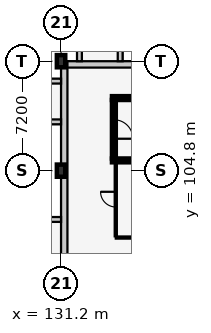
"""IFC4 building model, lengths in metres.
Left out: names, types, materials, properties, quantities, classifications, styles, units other than length and angle.
Written with IfcOpenShell. Run it as: python <this file> out.ifc"""

import sys

from ifc_helpers import new_model, si_unit, direction, frame, frame_2d, origin, origin_2d, place, context, subcontext, project, spatial, rectangle, extrude, element, fill, save


model = new_model("IFC4")
c1 = context("Model", 3, precision=1e-05, world=origin(), true_north=direction((0.0, 1.0)))
c2 = subcontext(c1, "Body", "Model", "MODEL_VIEW")
j1 = project(units=[si_unit("LENGTHUNIT", "METRE"), si_unit("PLANEANGLEUNIT", "RADIAN")], contexts=[c1])
p1 = place(None, origin())
s1 = spatial("IfcSite", under=j1, at=p1, CompositionType="ELEMENT")
p2 = place(p1, origin())
s2 = spatial("IfcBuilding", under=s1, at=p2, CompositionType="ELEMENT")
p3 = place(p2, frame((0.0, 0.0, 13.8)))
s3 = spatial("IfcBuildingStorey", under=s2, at=p3, CompositionType="ELEMENT", Elevation=13.8)
for number, where, z_axis, x_axis in (
    (1, (131.2, 104.8, 0.0), (0.0, 0.0, 1.0), (1.0, 0.0, 0.0)),
    (2, (131.2, 112.0, 0.0), (0.0, 0.0, 1.0), (1.0, 0.0, 0.0)),
):
    element("IfcColumn", number, at=place(p3, frame(where, z_axis=z_axis, x_axis=x_axis)), inside=s3, PredefinedType="COLUMN", context=c2, shape_type="SweptSolid", body=[
        extrude(rectangle(XDim=0.55, YDim=0.8, at=origin_2d()), origin(), (0.0, 0.0, 1.0), 4.2),
    ])
p4 = place(p3, frame((131.2, 111.79, 0.0), z_axis=(0.0, 0.0, 1.0), x_axis=(1.0, 0.0, 0.0)))
e3 = element("IfcWall", 3, at=p4, inside=s3, PredefinedType="SOLIDWALL", context=c2, shape_type="SweptSolid", body=[
    extrude(rectangle(XDim=28.8, YDim=0.42, at=frame_2d((14.4, 0.0))), origin(), (0.0, 0.0, 1.0), 3.245),
])
p5 = place(p3, frame((132.41, 112.0, 0.0), z_axis=(0.0, 0.0, 1.0), x_axis=(0.0, 1.0, 0.0)))
e4 = element("IfcWall", 4, at=p5, inside=s3, PredefinedType="SOLIDWALL", context=c2, shape_type="SweptSolid", body=[
    extrude(rectangle(XDim=1.793, YDim=0.32, at=frame_2d((0.896, 0.0))), origin(), (0.0, 0.0, 1.0), 3.93),
])
p6 = place(p3, frame((135.09, 112.0, 0.0), z_axis=(0.0, 0.0, 1.0), x_axis=(0.0, 1.0, 0.0)))
e5 = element("IfcWall", 5, at=p6, inside=s3, PredefinedType="SOLIDWALL", context=c2, shape_type="SweptSolid", body=[
    extrude(rectangle(XDim=1.35, YDim=0.32, at=frame_2d((0.675, 0.0))), origin(), (0.0, 0.0, 1.0), 3.93),
])
p7 = place(p3, frame((131.41, 83.2, 0.0), z_axis=(0.0, 0.0, 1.0), x_axis=(0.0, 1.0, 0.0)))
e6 = element("IfcWall", 6, at=p7, inside=s3, PredefinedType="SOLIDWALL", context=c2, shape_type="SweptSolid", body=[
    extrude(rectangle(XDim=28.8, YDim=0.42, at=frame_2d((14.4, 0.0))), origin(), (0.0, 0.0, 1.0), 3.205),
])
for number, where, z_axis, x_axis in (
    (7, (131.2, 101.59, 0.0), (0.0, 0.0, 1.0), (-1.0, 0.0, 0.0)),
    (8, (131.2, 108.01, 0.0), (0.0, 0.0, 1.0), (-1.0, 0.0, 0.0)),
):
    element("IfcWall", number, at=place(p3, frame(where, z_axis=z_axis, x_axis=x_axis)), inside=s3, PredefinedType="SOLIDWALL", context=c2, shape_type="SweptSolid", body=[
        extrude(rectangle(XDim=1.35, YDim=0.32, at=frame_2d((0.675, 0.0))), origin(), (0.0, 0.0, 1.0), 3.93),
    ])
p8 = place(p3, frame((131.2, 110.69, 0.0), z_axis=(0.0, 0.0, 1.0), x_axis=(-1.0, 0.0, 0.0)))
e9 = element("IfcWall", 9, at=p8, inside=s3, PredefinedType="SOLIDWALL", context=c2, shape_type="SweptSolid", body=[
    extrude(rectangle(XDim=1.793, YDim=0.32, at=frame_2d((0.896, 0.0))), origin(), (0.0, 0.0, 1.0), 3.93),
])
for number, where, z_axis, x_axis in (
    (10, (134.55, 105.475, 0.0), (0.0, 0.0, 1.0), (1.0, 0.0, 0.0)),
    (11, (143.45, 109.575, 0.0), (0.0, 0.0, 1.0), (-1.0, 0.0, 0.0)),
):
    element("IfcWall", number, at=place(p3, frame(where, z_axis=z_axis, x_axis=x_axis)), inside=s3, PredefinedType="SHEAR", context=c2, shape_type="SweptSolid", body=[
        extrude(rectangle(XDim=8.9, YDim=0.25, at=frame_2d((4.45, 0.0))), origin(), (0.0, 0.0, 1.0), 3.95),
    ])
p9 = place(p3, frame((134.675, 109.45, 0.0), z_axis=(0.0, 0.0, 1.0), x_axis=(0.0, -1.0, 0.0)))
e12 = element("IfcWall", 12, at=p9, inside=s3, PredefinedType="SHEAR", context=c2, shape_type="SweptSolid", body=[
    extrude(rectangle(XDim=3.85, YDim=0.25, at=frame_2d((1.925, 0.0))), origin(), (0.0, 0.0, 1.0), 3.95),
])
p10 = place(p9, frame((1.3, 0.0, 0.0)))
e13 = element("IfcOpeningElement", 13, at=p10, cuts=e12, PredefinedType="OPENING", context=c2, shape_type="SweptSolid", body=[
    extrude(rectangle(XDim=1.25, YDim=2.15, at=frame_2d((0.625, 1.075))), frame((0.0, 0.137, 0.0), z_axis=(0.0, -1.0, 0.0), x_axis=(1.0, 0.0, 0.0)), (0.0, 0.0, 1.0), 0.274),
])
p11 = place(p3, frame((134.8, 100.4, 0.0), z_axis=(0.0, 0.0, 1.0), x_axis=(1.0, 0.0, 0.0)))
e14 = element("IfcWall", 14, at=p11, inside=s3, PredefinedType="PARTITIONING", context=c2, shape_type="SweptSolid", body=[
    extrude(rectangle(XDim=2.6, YDim=0.14, at=frame_2d((1.3, 0.0))), origin(), (0.0, 0.0, 1.0), 3.95),
])
p12 = place(p3, frame((134.8, 100.48, 0.0), z_axis=(0.0, 0.0, 1.0), x_axis=(0.0, 1.0, 0.0)))
e15 = element("IfcWall", 15, at=p12, inside=s3, PredefinedType="PARTITIONING", context=c2, shape_type="SweptSolid", body=[
    extrude(rectangle(XDim=4.86, YDim=0.14, at=frame_2d((2.43, 0.0))), origin(), (0.0, 0.0, 1.0), 3.685),
])
p13 = place(p12, frame((1.93, 0.0, 0.0)))
e16 = element("IfcOpeningElement", 16, at=p13, cuts=e15, PredefinedType="OPENING", context=c2, shape_type="SweptSolid", body=[
    extrude(rectangle(XDim=1.0, YDim=2.1, at=frame_2d((0.5, 1.05))), frame((0.0, 0.082, 0.0), z_axis=(0.0, -1.0, 0.0), x_axis=(1.0, 0.0, 0.0)), (0.0, 0.0, 1.0), 0.164),
])
p14 = place(p10, origin())
e17 = element("IfcDoor", 17, at=p14, inside=s3, OperationType="SINGLE_SWING_RIGHT", PredefinedType="DOOR", context=c2, shape_type="SweptSolid", body=[
    extrude(rectangle(XDim=1.25, YDim=2.15, at=frame_2d((0.625, 1.075))), frame((0.0, 0.025, 0.0), z_axis=(0.0, -1.0, 0.0), x_axis=(1.0, 0.0, 0.0)), (0.0, 0.0, 1.0), 0.05),
])
fill(e13, e17)
p15 = place(p13, origin())
e18 = element("IfcDoor", 18, at=p15, inside=s3, OperationType="SINGLE_SWING_RIGHT", PredefinedType="DOOR", context=c2, shape_type="SweptSolid", body=[
    extrude(rectangle(XDim=1.0, YDim=2.1, at=frame_2d((0.5, 1.05))), frame((0.0, 0.025, 0.0), z_axis=(0.0, -1.0, 0.0), x_axis=(1.0, 0.0, 0.0)), (0.0, 0.0, 1.0), 0.05),
])
fill(e16, e18)
save(model, sys.argv[1])
